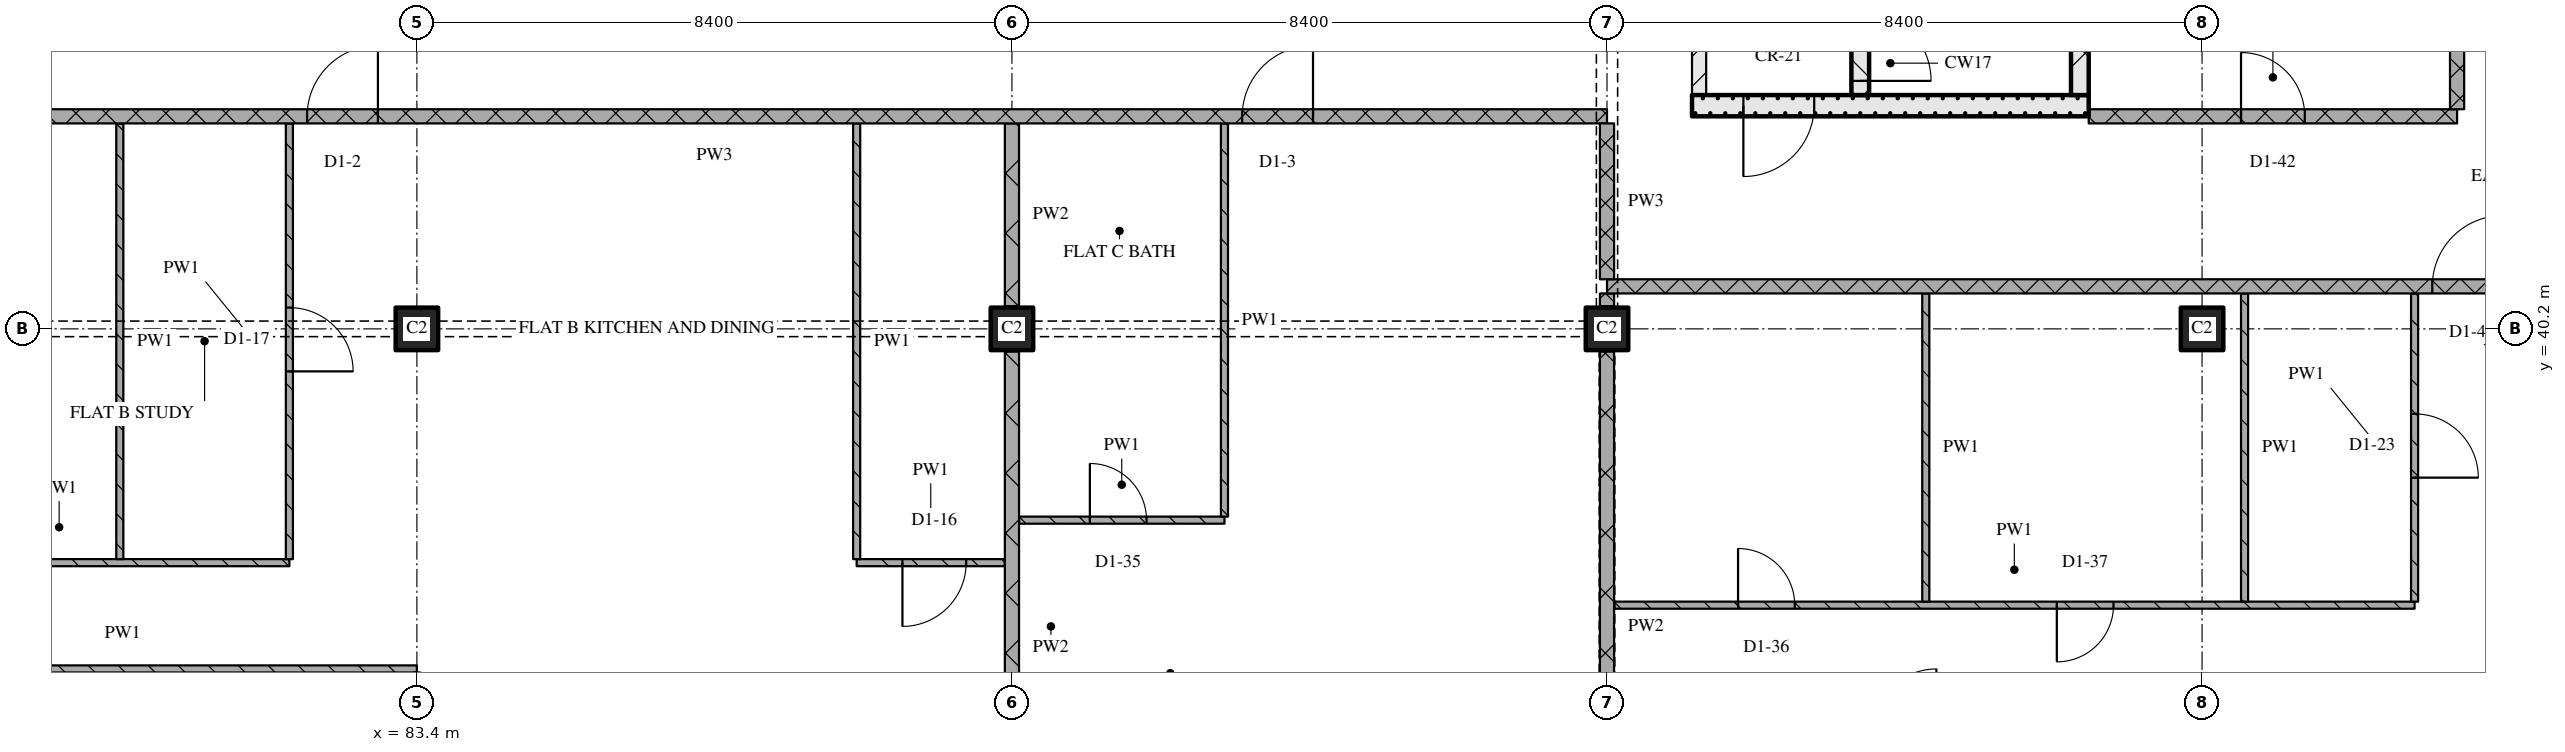
"""IFC4 building model, lengths in metres.
Left out: names, types, materials, properties, quantities, classifications, styles, units other than length and angle.
Written with IfcOpenShell. Run it as: python <this file> out.ifc"""

import sys

from ifc_helpers import new_model, si_unit, direction, frame, frame_2d, origin, origin_2d, place, context, subcontext, project, spatial, rectangle, extrude, element, fill, save


model = new_model("IFC4")
c1 = context("Model", 3, precision=1e-05, world=origin(), true_north=direction((0.0, 1.0)))
c2 = subcontext(c1, "Body", "Model", "MODEL_VIEW")
j1 = project(units=[si_unit("LENGTHUNIT", "METRE"), si_unit("PLANEANGLEUNIT", "RADIAN")], contexts=[c1])
p1 = place(None, origin())
s1 = spatial("IfcSite", under=j1, at=p1, CompositionType="ELEMENT")
p2 = place(p1, origin())
s2 = spatial("IfcBuilding", under=s1, at=p2, CompositionType="ELEMENT")
p3 = place(p2, frame((0.0, 0.0, 205.5)))
s3 = spatial("IfcBuildingStorey", under=s2, at=p3, CompositionType="ELEMENT", Elevation=205.5)
for number, where, z_axis, x_axis in (
    (1, (83.4, 40.2, 0.0), (0.0, 0.0, 1.0), (1.0, 0.0, 0.0)),
    (2, (91.8, 40.2, 0.0), (0.0, 0.0, 1.0), (1.0, 0.0, 0.0)),
    (3, (100.2, 40.2, 0.0), (0.0, 0.0, 1.0), (1.0, 0.0, 0.0)),
    (4, (108.6, 40.2, 0.0), (0.0, 0.0, 1.0), (1.0, 0.0, 0.0)),
):
    element("IfcColumn", number, at=place(p3, frame(where, z_axis=z_axis, x_axis=x_axis)), inside=s3, PredefinedType="COLUMN", context=c2, shape_type="SweptSolid", body=[
        extrude(rectangle(XDim=0.6, YDim=0.6, at=origin_2d()), origin(), (0.0, 0.0, 1.0), 3.6),
    ])
p4 = place(p3, frame((101.4, 43.35, 0.0), z_axis=(0.0, 0.0, 1.0), x_axis=(1.0, 0.0, 0.0)))
e5 = element("IfcWall", 5, at=p4, inside=s3, PredefinedType="SOLIDWALL", context=c2, shape_type="SweptSolid", body=[
    extrude(rectangle(XDim=5.6, YDim=0.3, at=frame_2d((2.8, 0.0))), origin(), (0.0, 0.0, 1.0), 3.32),
])
p5 = place(p4, frame((0.725, 0.0, 0.0)))
e6 = element("IfcOpeningElement", 6, at=p5, cuts=e5, PredefinedType="OPENING", context=c2, shape_type="SweptSolid", body=[
    extrude(rectangle(XDim=1.0, YDim=2.1, at=frame_2d((0.5, 1.05))), frame((0.0, 0.16, 0.0), z_axis=(0.0, -1.0, 0.0), x_axis=(1.0, 0.0, 0.0)), (0.0, 0.0, 1.0), 0.32),
])
p6 = place(p3, frame((101.5, 43.5, 0.0), z_axis=(0.0, 0.0, 1.0), x_axis=(0.0, 1.0, 0.0)))
e7 = element("IfcWall", 7, at=p6, inside=s3, PredefinedType="PARTITIONING", context=c2, shape_type="SweptSolid", body=[
    extrude(rectangle(XDim=6.9, YDim=0.2, at=frame_2d((3.45, 0.0))), origin(), (0.0, 0.0, 1.0), 3.32),
])
p7 = place(p6, frame((1.0, 0.0, 0.0)))
e8 = element("IfcOpeningElement", 8, at=p7, cuts=e7, PredefinedType="OPENING", context=c2, shape_type="SweptSolid", body=[
    extrude(rectangle(XDim=1.0, YDim=2.1, at=frame_2d((0.5, 1.05))), frame((0.0, 0.11, 0.0), z_axis=(0.0, -1.0, 0.0), x_axis=(1.0, 0.0, 0.0)), (0.0, 0.0, 1.0), 0.22),
])
p8 = place(p3, frame((103.775, 43.5, 0.0), z_axis=(0.0, 0.0, 1.0), x_axis=(0.0, 1.0, 0.0)))
e9 = element("IfcWall", 9, at=p8, inside=s3, PredefinedType="SOLIDWALL", context=c2, shape_type="SweptSolid", body=[
    extrude(rectangle(XDim=6.9, YDim=0.25, at=frame_2d((3.45, 0.0))), origin(), (0.0, 0.0, 1.0), 3.32),
])
p9 = place(p8, frame((0.2, 0.0, 0.0)))
e10 = element("IfcOpeningElement", 10, at=p9, cuts=e9, PredefinedType="OPENING", context=c2, shape_type="SweptSolid", body=[
    extrude(rectangle(XDim=1.0, YDim=2.1, at=frame_2d((0.5, 1.05))), frame((0.0, 0.135, 0.0), z_axis=(0.0, -1.0, 0.0), x_axis=(1.0, 0.0, 0.0)), (0.0, 0.0, 1.0), 0.27),
])
p10 = place(p3, frame((106.875, 43.5, 0.0), z_axis=(0.0, 0.0, 1.0), x_axis=(0.0, 1.0, 0.0)))
e11 = element("IfcWall", 11, at=p10, inside=s3, PredefinedType="SOLIDWALL", context=c2, shape_type="SweptSolid", body=[
    extrude(rectangle(XDim=6.9, YDim=0.25, at=frame_2d((3.45, 0.0))), origin(), (0.0, 0.0, 1.0), 3.32),
])
p11 = place(p3, frame((75.1, 35.4, 0.0), z_axis=(0.0, 0.0, 1.0), x_axis=(1.0, 0.0, 0.0)))
e12 = element("IfcWall", 12, at=p11, inside=s3, PredefinedType="PARTITIONING", context=c2, shape_type="SweptSolid", body=[
    extrude(rectangle(XDim=8.3, YDim=0.1, at=frame_2d((4.15, 0.0))), origin(), (0.0, 0.0, 1.0), 3.32),
])
p12 = place(p3, frame((100.3, 36.3, 0.0), z_axis=(0.0, 0.0, 1.0), x_axis=(1.0, 0.0, 0.0)))
e13 = element("IfcWall", 13, at=p12, inside=s3, PredefinedType="PARTITIONING", context=c2, shape_type="SweptSolid", body=[
    extrude(rectangle(XDim=11.3, YDim=0.1, at=frame_2d((5.65, 0.0))), origin(), (0.0, 0.0, 1.0), 3.32),
])
p13 = place(p12, frame((1.75, 0.0, 0.0)))
e14 = element("IfcOpeningElement", 14, at=p13, cuts=e13, PredefinedType="OPENING", context=c2, shape_type="SweptSolid", body=[
    extrude(rectangle(XDim=0.8, YDim=2.1, at=frame_2d((0.4, 1.05))), frame((0.0, 0.06, 0.0), z_axis=(0.0, -1.0, 0.0), x_axis=(1.0, 0.0, 0.0)), (0.0, 0.0, 1.0), 0.12),
])
p14 = place(p12, frame((6.25, 0.0, 0.0)))
e15 = element("IfcOpeningElement", 15, at=p14, cuts=e13, PredefinedType="OPENING", context=c2, shape_type="SweptSolid", body=[
    extrude(rectangle(XDim=0.8, YDim=2.1, at=frame_2d((0.4, 1.05))), frame((0.0, 0.06, 0.0), z_axis=(0.0, -1.0, 0.0), x_axis=(1.0, 0.0, 0.0)), (0.0, 0.0, 1.0), 0.12),
])
p15 = place(p3, frame((75.1, 36.9, 0.0), z_axis=(0.0, 0.0, 1.0), x_axis=(1.0, 0.0, 0.0)))
e16 = element("IfcWall", 16, at=p15, inside=s3, PredefinedType="PARTITIONING", context=c2, shape_type="SweptSolid", body=[
    extrude(rectangle(XDim=6.5, YDim=0.1, at=frame_2d((3.25, 0.0))), origin(), (0.0, 0.0, 1.0), 3.32),
])
p16 = place(p15, frame((1.603, 0.0, 0.0)))
e17 = element("IfcOpeningElement", 17, at=p16, cuts=e16, PredefinedType="OPENING", context=c2, shape_type="SweptSolid", body=[
    extrude(rectangle(XDim=0.8, YDim=2.1, at=frame_2d((0.4, 1.05))), frame((0.0, 0.06, 0.0), z_axis=(0.0, -1.0, 0.0), x_axis=(1.0, 0.0, 0.0)), (0.0, 0.0, 1.0), 0.12),
])
p17 = place(p3, frame((89.608, 36.9, 0.0), z_axis=(0.0, 0.0, 1.0), x_axis=(1.0, 0.0, 0.0)))
e18 = element("IfcWall", 18, at=p17, inside=s3, PredefinedType="PARTITIONING", context=c2, shape_type="SweptSolid", body=[
    extrude(rectangle(XDim=2.092, YDim=0.1, at=frame_2d((1.046, 0.0))), origin(), (0.0, 0.0, 1.0), 3.32),
])
p18 = place(p17, frame((0.646, 0.0, 0.0)))
e19 = element("IfcOpeningElement", 19, at=p18, cuts=e18, PredefinedType="OPENING", context=c2, shape_type="SweptSolid", body=[
    extrude(rectangle(XDim=0.9, YDim=2.1, at=frame_2d((0.45, 1.05))), frame((0.0, 0.06, 0.0), z_axis=(0.0, -1.0, 0.0), x_axis=(1.0, 0.0, 0.0)), (0.0, 0.0, 1.0), 0.12),
])
p19 = place(p3, frame((91.9, 37.5, 0.0), z_axis=(0.0, 0.0, 1.0), x_axis=(1.0, 0.0, 0.0)))
e20 = element("IfcWall", 20, at=p19, inside=s3, PredefinedType="PARTITIONING", context=c2, shape_type="SweptSolid", body=[
    extrude(rectangle(XDim=2.9, YDim=0.1, at=frame_2d((1.45, 0.0))), origin(), (0.0, 0.0, 1.0), 3.32),
])
p20 = place(p19, frame((1.0, 0.0, 0.0)))
e21 = element("IfcOpeningElement", 21, at=p20, cuts=e20, PredefinedType="OPENING", context=c2, shape_type="SweptSolid", body=[
    extrude(rectangle(XDim=0.8, YDim=2.1, at=frame_2d((0.4, 1.05))), frame((0.0, 0.06, 0.0), z_axis=(0.0, -1.0, 0.0), x_axis=(1.0, 0.0, 0.0)), (0.0, 0.0, 1.0), 0.12),
])
p21 = place(p3, frame((124.58, 40.8, 0.0), z_axis=(0.0, 0.0, 1.0), x_axis=(-1.0, 0.0, 0.0)))
e22 = element("IfcWall", 22, at=p21, inside=s3, PredefinedType="PARTITIONING", context=c2, shape_type="SweptSolid", body=[
    extrude(rectangle(XDim=24.38, YDim=0.2, at=frame_2d((12.19, 0.0))), origin(), (0.0, 0.0, 1.0), 3.32),
])
p22 = place(p21, frame((11.73, 0.0, 0.0)))
e23 = element("IfcOpeningElement", 23, at=p22, cuts=e22, PredefinedType="OPENING", context=c2, shape_type="SweptSolid", body=[
    extrude(rectangle(XDim=1.0, YDim=2.1, at=frame_2d((0.5, 1.05))), frame((0.0, 0.11, 0.0), z_axis=(0.0, -1.0, 0.0), x_axis=(1.0, 0.0, 0.0)), (0.0, 0.0, 1.0), 0.22),
])
p23 = place(p3, frame((100.2, 43.2, 0.0), z_axis=(0.0, 0.0, 1.0), x_axis=(-1.0, 0.0, 0.0)))
e24 = element("IfcWall", 24, at=p23, inside=s3, PredefinedType="PARTITIONING", context=c2, shape_type="SweptSolid", body=[
    extrude(rectangle(XDim=25.2, YDim=0.2, at=frame_2d((12.6, 0.0))), origin(), (0.0, 0.0, 1.0), 3.32),
])
p24 = place(p23, frame((4.15, 0.0, 0.0)))
e25 = element("IfcOpeningElement", 25, at=p24, cuts=e24, PredefinedType="OPENING", context=c2, shape_type="SweptSolid", body=[
    extrude(rectangle(XDim=1.0, YDim=2.1, at=frame_2d((0.5, 1.05))), frame((0.0, 0.11, 0.0), z_axis=(0.0, -1.0, 0.0), x_axis=(1.0, 0.0, 0.0)), (0.0, 0.0, 1.0), 0.22),
])
p25 = place(p23, frame((17.35, 0.0, 0.0)))
e26 = element("IfcOpeningElement", 26, at=p25, cuts=e24, PredefinedType="OPENING", context=c2, shape_type="SweptSolid", body=[
    extrude(rectangle(XDim=1.0, YDim=2.1, at=frame_2d((0.5, 1.05))), frame((0.0, 0.11, 0.0), z_axis=(0.0, -1.0, 0.0), x_axis=(1.0, 0.0, 0.0)), (0.0, 0.0, 1.0), 0.22),
])
p26 = place(p3, frame((107.0, 43.2, 0.0), z_axis=(0.0, 0.0, 1.0), x_axis=(1.0, 0.0, 0.0)))
e27 = element("IfcWall", 27, at=p26, inside=s3, PredefinedType="PARTITIONING", context=c2, shape_type="SweptSolid", body=[
    extrude(rectangle(XDim=5.2, YDim=0.2, at=frame_2d((2.6, 0.0))), origin(), (0.0, 0.0, 1.0), 3.32),
])
p27 = place(p26, frame((2.15, 0.0, 0.0)))
e28 = element("IfcOpeningElement", 28, at=p27, cuts=e27, PredefinedType="OPENING", context=c2, shape_type="SweptSolid", body=[
    extrude(rectangle(XDim=0.9, YDim=2.1, at=frame_2d((0.45, 1.05))), frame((0.0, 0.11, 0.0), z_axis=(0.0, -1.0, 0.0), x_axis=(1.0, 0.0, 0.0)), (0.0, 0.0, 1.0), 0.22),
])
p28 = place(p3, frame((79.206, 43.1, 0.0), z_axis=(0.0, 0.0, 1.0), x_axis=(0.0, -1.0, 0.0)))
e29 = element("IfcWall", 29, at=p28, inside=s3, PredefinedType="PARTITIONING", context=c2, shape_type="SweptSolid", body=[
    extrude(rectangle(XDim=6.15, YDim=0.1, at=frame_2d((3.075, 0.0))), origin(), (0.0, 0.0, 1.0), 3.32),
])
p29 = place(p3, frame((81.6, 36.95, 0.0), z_axis=(0.0, 0.0, 1.0), x_axis=(0.0, 1.0, 0.0)))
e30 = element("IfcWall", 30, at=p29, inside=s3, PredefinedType="PARTITIONING", context=c2, shape_type="SweptSolid", body=[
    extrude(rectangle(XDim=6.15, YDim=0.1, at=frame_2d((3.075, 0.0))), origin(), (0.0, 0.0, 1.0), 3.32),
])
p30 = place(p29, frame((2.65, 0.0, 0.0)))
e31 = element("IfcOpeningElement", 31, at=p30, cuts=e30, PredefinedType="OPENING", context=c2, shape_type="SweptSolid", body=[
    extrude(rectangle(XDim=0.9, YDim=2.1, at=frame_2d((0.45, 1.05))), frame((0.0, 0.06, 0.0), z_axis=(0.0, -1.0, 0.0), x_axis=(1.0, 0.0, 0.0)), (0.0, 0.0, 1.0), 0.12),
])
p31 = place(p3, frame((89.608, 43.1, 0.0), z_axis=(0.0, 0.0, 1.0), x_axis=(0.0, -1.0, 0.0)))
e32 = element("IfcWall", 32, at=p31, inside=s3, PredefinedType="PARTITIONING", context=c2, shape_type="SweptSolid", body=[
    extrude(rectangle(XDim=6.15, YDim=0.1, at=frame_2d((3.075, 0.0))), origin(), (0.0, 0.0, 1.0), 3.32),
])
p32 = place(p3, frame((91.8, 39.88, 0.0), z_axis=(0.0, 0.0, 1.0), x_axis=(0.0, -1.0, 0.0)))
e33 = element("IfcWall", 33, at=p32, inside=s3, PredefinedType="PARTITIONING", context=c2, shape_type="SweptSolid", body=[
    extrude(rectangle(XDim=7.76, YDim=0.2, at=frame_2d((3.88, 0.0))), origin(), (0.0, 0.0, 1.0), 3.32),
])
p33 = place(p3, frame((91.8, 43.1, 0.0), z_axis=(0.0, 0.0, 1.0), x_axis=(0.0, -1.0, 0.0)))
e34 = element("IfcWall", 34, at=p33, inside=s3, PredefinedType="PARTITIONING", context=c2, shape_type="SweptSolid", body=[
    extrude(rectangle(XDim=2.58, YDim=0.2, at=frame_2d((1.29, 0.0))), origin(), (0.0, 0.0, 1.0), 3.32),
])
p34 = place(p3, frame((94.8, 43.1, 0.0), z_axis=(0.0, 0.0, 1.0), x_axis=(0.0, -1.0, 0.0)))
e35 = element("IfcWall", 35, at=p34, inside=s3, PredefinedType="PARTITIONING", context=c2, shape_type="SweptSolid", body=[
    extrude(rectangle(XDim=5.55, YDim=0.1, at=frame_2d((2.775, 0.0))), origin(), (0.0, 0.0, 1.0), 3.32),
])
p35 = place(p3, frame((100.2, 43.1, 0.0), z_axis=(0.0, 0.0, 1.0), x_axis=(0.0, -1.0, 0.0)))
e36 = element("IfcWall", 36, at=p35, inside=s3, PredefinedType="PARTITIONING", context=c2, shape_type="SweptSolid", body=[
    extrude(rectangle(XDim=2.2, YDim=0.2, at=frame_2d((1.1, 0.0))), origin(), (0.0, 0.0, 1.0), 2.53),
])
p36 = place(p3, frame((100.2, 39.88, 0.0), z_axis=(0.0, 0.0, 1.0), x_axis=(0.0, -1.0, 0.0)))
e37 = element("IfcWall", 37, at=p36, inside=s3, PredefinedType="PARTITIONING", context=c2, shape_type="SweptSolid", body=[
    extrude(rectangle(XDim=7.76, YDim=0.2, at=frame_2d((3.88, 0.0))), origin(), (0.0, 0.0, 1.0), 2.72),
])
p37 = place(p3, frame((100.2, 40.7, 0.0), z_axis=(0.0, 0.0, 1.0), x_axis=(0.0, -1.0, 0.0)))
e38 = element("IfcWall", 38, at=p37, inside=s3, PredefinedType="PARTITIONING", context=c2, shape_type="SweptSolid", body=[
    extrude(rectangle(XDim=0.18, YDim=0.2, at=frame_2d((0.09, 0.0))), origin(), (0.0, 0.0, 1.0), 3.32),
])
for number, where, z_axis, x_axis in (
    (39, (104.7, 40.7, 0.0), (0.0, 0.0, 1.0), (0.0, -1.0, 0.0)),
    (40, (109.2, 40.7, 0.0), (0.0, 0.0, 1.0), (0.0, -1.0, 0.0)),
):
    element("IfcWall", number, at=place(p3, frame(where, z_axis=z_axis, x_axis=x_axis)), inside=s3, PredefinedType="PARTITIONING", context=c2, shape_type="SweptSolid", body=[
        extrude(rectangle(XDim=4.35, YDim=0.1, at=frame_2d((2.175, 0.0))), origin(), (0.0, 0.0, 1.0), 3.32),
    ])
p38 = place(p3, frame((111.6, 36.35, 0.0), z_axis=(0.0, 0.0, 1.0), x_axis=(0.0, 1.0, 0.0)))
e41 = element("IfcWall", 41, at=p38, inside=s3, PredefinedType="PARTITIONING", context=c2, shape_type="SweptSolid", body=[
    extrude(rectangle(XDim=4.35, YDim=0.1, at=frame_2d((2.175, 0.0))), origin(), (0.0, 0.0, 1.0), 3.32),
])
p39 = place(p38, frame((1.75, 0.0, 0.0)))
e42 = element("IfcOpeningElement", 42, at=p39, cuts=e41, PredefinedType="OPENING", context=c2, shape_type="SweptSolid", body=[
    extrude(rectangle(XDim=0.9, YDim=2.1, at=frame_2d((0.45, 1.05))), frame((0.0, 0.06, 0.0), z_axis=(0.0, -1.0, 0.0), x_axis=(1.0, 0.0, 0.0)), (0.0, 0.0, 1.0), 0.12),
])
p40 = place(p3, frame((112.2, 43.3, 0.0), z_axis=(0.0, 0.0, 1.0), x_axis=(0.0, 1.0, 0.0)))
e43 = element("IfcWall", 43, at=p40, inside=s3, PredefinedType="PARTITIONING", context=c2, shape_type="SweptSolid", body=[
    extrude(rectangle(XDim=15.4, YDim=0.2, at=frame_2d((7.7, 0.0))), origin(), (0.0, 0.0, 1.0), 3.32),
])
p41 = place(p40, frame((10.95, 0.0, 0.0)))
e44 = element("IfcOpeningElement", 44, at=p41, cuts=e43, PredefinedType="OPENING", context=c2, shape_type="SweptSolid", body=[
    extrude(rectangle(XDim=1.0, YDim=2.1, at=frame_2d((0.5, 1.05))), frame((0.0, 0.11, 0.0), z_axis=(0.0, -1.0, 0.0), x_axis=(1.0, 0.0, 0.0)), (0.0, 0.0, 1.0), 0.22),
])
p42 = place(p5, origin())
e45 = element("IfcDoor", 45, at=p42, inside=s3, OperationType="SINGLE_SWING_RIGHT", PredefinedType="DOOR", context=c2, shape_type="SweptSolid", body=[
    extrude(rectangle(XDim=1.0, YDim=2.1, at=frame_2d((0.5, 1.05))), frame((0.0, 0.025, 0.0), z_axis=(0.0, -1.0, 0.0), x_axis=(1.0, 0.0, 0.0)), (0.0, 0.0, 1.0), 0.05),
])
fill(e6, e45)
p43 = place(p9, origin())
e46 = element("IfcDoor", 46, at=p43, inside=s3, OperationType="SINGLE_SWING_RIGHT", PredefinedType="DOOR", context=c2, shape_type="SweptSolid", body=[
    extrude(rectangle(XDim=1.0, YDim=2.1, at=frame_2d((0.5, 1.05))), frame((0.0, 0.025, 0.0), z_axis=(0.0, -1.0, 0.0), x_axis=(1.0, 0.0, 0.0)), (0.0, 0.0, 1.0), 0.05),
])
fill(e10, e46)
p44 = place(p13, origin())
e47 = element("IfcDoor", 47, at=p44, inside=s3, OperationType="SINGLE_SWING_LEFT", PredefinedType="DOOR", context=c2, shape_type="SweptSolid", body=[
    extrude(rectangle(XDim=0.8, YDim=2.1, at=frame_2d((0.4, 1.05))), frame((0.0, 0.025, 0.0), z_axis=(0.0, -1.0, 0.0), x_axis=(1.0, 0.0, 0.0)), (0.0, 0.0, 1.0), 0.05),
])
fill(e14, e47)
p45 = place(p14, origin())
e48 = element("IfcDoor", 48, at=p45, inside=s3, OperationType="SINGLE_SWING_RIGHT", PredefinedType="DOOR", context=c2, shape_type="SweptSolid", body=[
    extrude(rectangle(XDim=0.8, YDim=2.1, at=frame_2d((0.4, 1.05))), frame((0.0, 0.025, 0.0), z_axis=(0.0, -1.0, 0.0), x_axis=(1.0, 0.0, 0.0)), (0.0, 0.0, 1.0), 0.05),
])
fill(e15, e48)
p46 = place(p18, origin())
e49 = element("IfcDoor", 49, at=p46, inside=s3, OperationType="SINGLE_SWING_RIGHT", PredefinedType="DOOR", context=c2, shape_type="SweptSolid", body=[
    extrude(rectangle(XDim=0.9, YDim=2.1, at=frame_2d((0.45, 1.05))), frame((0.0, 0.025, 0.0), z_axis=(0.0, -1.0, 0.0), x_axis=(1.0, 0.0, 0.0)), (0.0, 0.0, 1.0), 0.05),
])
fill(e19, e49)
p47 = place(p20, origin())
e50 = element("IfcDoor", 50, at=p47, inside=s3, OperationType="SINGLE_SWING_LEFT", PredefinedType="DOOR", context=c2, shape_type="SweptSolid", body=[
    extrude(rectangle(XDim=0.8, YDim=2.1, at=frame_2d((0.4, 1.05))), frame((0.0, 0.025, 0.0), z_axis=(0.0, -1.0, 0.0), x_axis=(1.0, 0.0, 0.0)), (0.0, 0.0, 1.0), 0.05),
])
fill(e21, e50)
p48 = place(p22, origin())
e51 = element("IfcDoor", 51, at=p48, inside=s3, OperationType="SINGLE_SWING_RIGHT", PredefinedType="DOOR", context=c2, shape_type="SweptSolid", body=[
    extrude(rectangle(XDim=1.0, YDim=2.1, at=frame_2d((0.5, 1.05))), frame((0.0, 0.025, 0.0), z_axis=(0.0, -1.0, 0.0), x_axis=(1.0, 0.0, 0.0)), (0.0, 0.0, 1.0), 0.05),
])
fill(e23, e51)
p49 = place(p24, origin())
e52 = element("IfcDoor", 52, at=p49, inside=s3, OperationType="SINGLE_SWING_RIGHT", PredefinedType="DOOR", context=c2, shape_type="SweptSolid", body=[
    extrude(rectangle(XDim=1.0, YDim=2.1, at=frame_2d((0.5, 1.05))), frame((0.0, 0.025, 0.0), z_axis=(0.0, -1.0, 0.0), x_axis=(1.0, 0.0, 0.0)), (0.0, 0.0, 1.0), 0.05),
])
fill(e25, e52)
p50 = place(p25, origin())
e53 = element("IfcDoor", 53, at=p50, inside=s3, OperationType="SINGLE_SWING_RIGHT", PredefinedType="DOOR", context=c2, shape_type="SweptSolid", body=[
    extrude(rectangle(XDim=1.0, YDim=2.1, at=frame_2d((0.5, 1.05))), frame((0.0, 0.025, 0.0), z_axis=(0.0, -1.0, 0.0), x_axis=(1.0, 0.0, 0.0)), (0.0, 0.0, 1.0), 0.05),
])
fill(e26, e53)
p51 = place(p27, origin())
e54 = element("IfcDoor", 54, at=p51, inside=s3, OperationType="SINGLE_SWING_LEFT", PredefinedType="DOOR", context=c2, shape_type="SweptSolid", body=[
    extrude(rectangle(XDim=0.9, YDim=2.1, at=frame_2d((0.45, 1.05))), frame((0.0, 0.025, 0.0), z_axis=(0.0, -1.0, 0.0), x_axis=(1.0, 0.0, 0.0)), (0.0, 0.0, 1.0), 0.05),
])
fill(e28, e54)
p52 = place(p30, origin())
e55 = element("IfcDoor", 55, at=p52, inside=s3, OperationType="SINGLE_SWING_RIGHT", PredefinedType="DOOR", context=c2, shape_type="SweptSolid", body=[
    extrude(rectangle(XDim=0.9, YDim=2.1, at=frame_2d((0.45, 1.05))), frame((0.0, 0.025, 0.0), z_axis=(0.0, -1.0, 0.0), x_axis=(1.0, 0.0, 0.0)), (0.0, 0.0, 1.0), 0.05),
])
fill(e31, e55)
p53 = place(p39, origin())
e56 = element("IfcDoor", 56, at=p53, inside=s3, OperationType="SINGLE_SWING_RIGHT", PredefinedType="DOOR", context=c2, shape_type="SweptSolid", body=[
    extrude(rectangle(XDim=0.9, YDim=2.1, at=frame_2d((0.45, 1.05))), frame((0.0, 0.025, 0.0), z_axis=(0.0, -1.0, 0.0), x_axis=(1.0, 0.0, 0.0)), (0.0, 0.0, 1.0), 0.05),
])
fill(e42, e56)
save(model, sys.argv[1])
